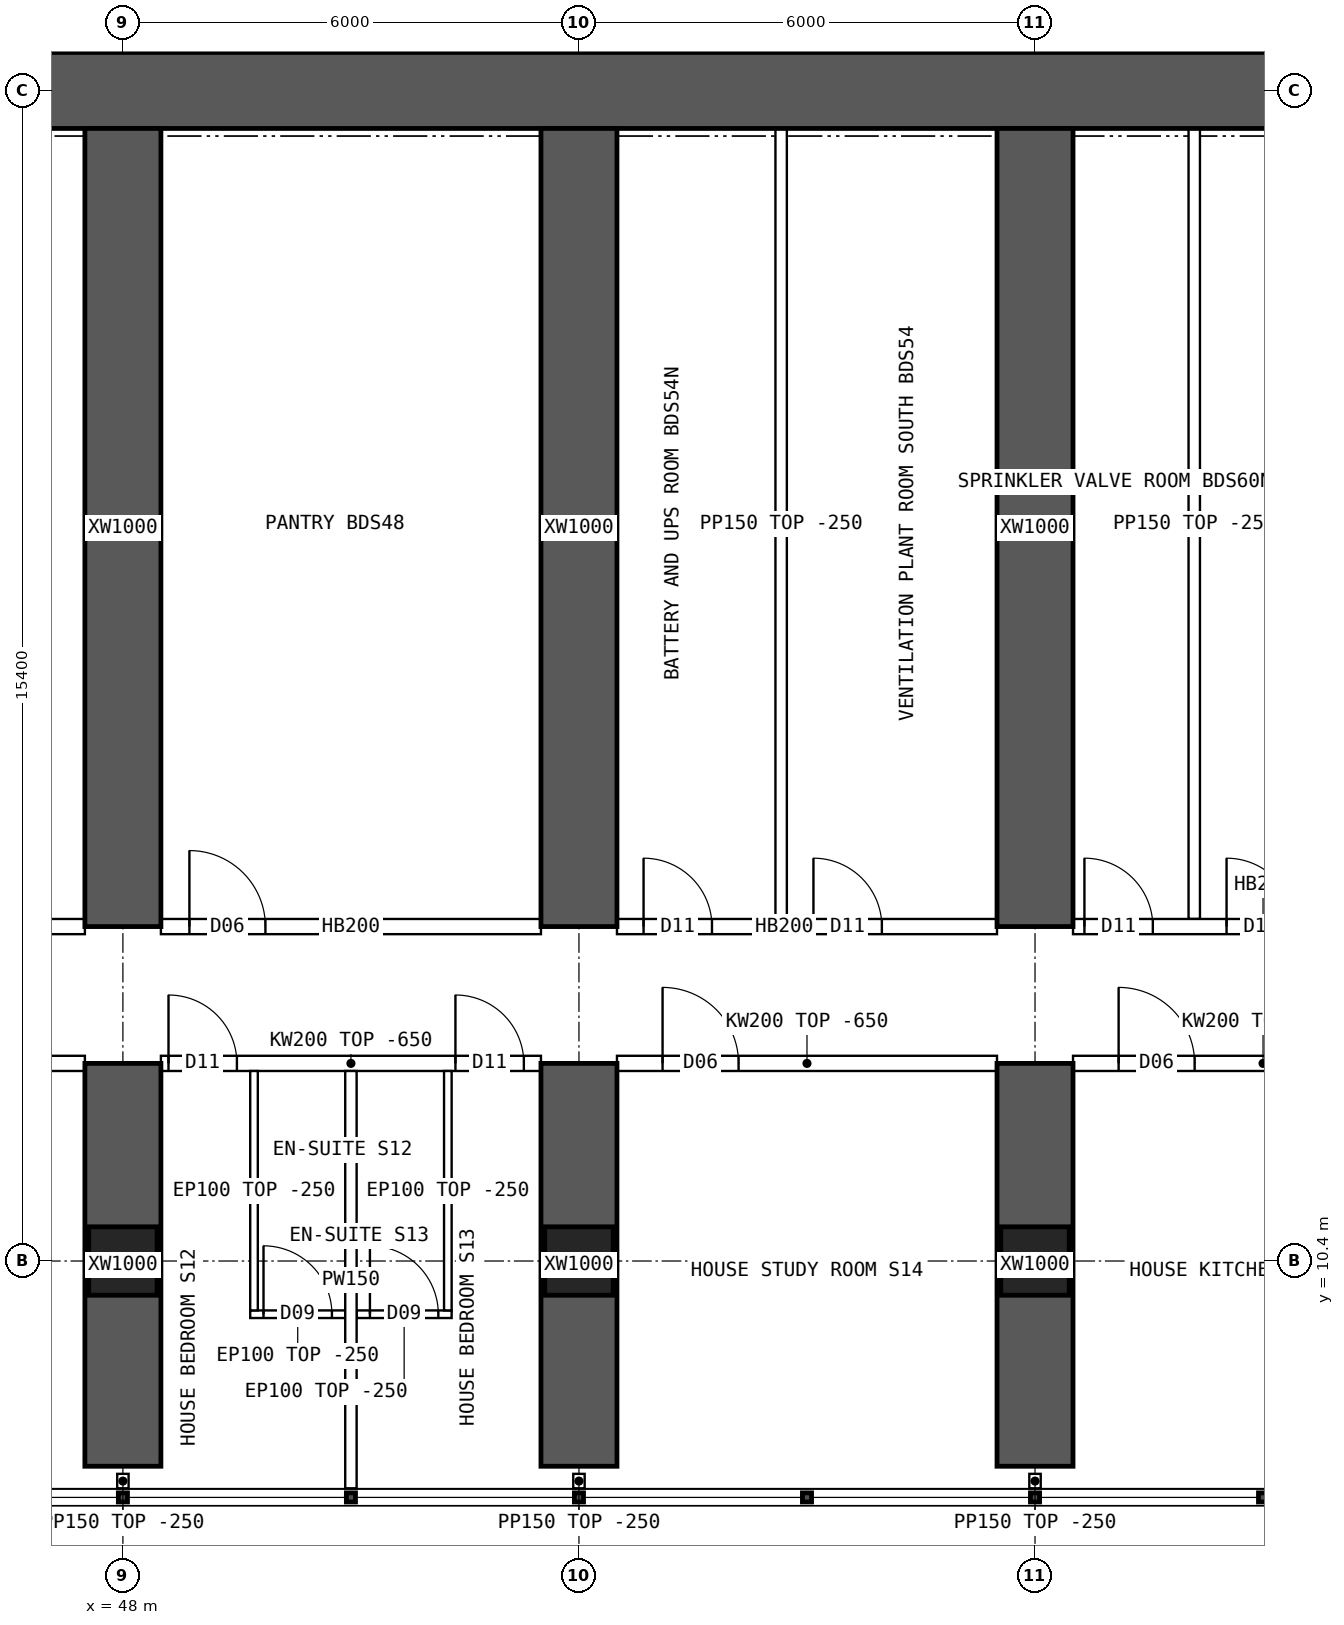
"""IFC4 building model, lengths in metres.
Left out: names, types, materials, properties, quantities, classifications, styles, units other than length and angle.
Written with IfcOpenShell. Run it as: python <this file> out.ifc"""

import sys

from ifc_helpers import new_model, si_unit, direction, frame, frame_2d, origin, origin_2d, place, context, subcontext, project, spatial, polyline, rectangle, hollow_rectangle, outline, extrude, element, fill, save


model = new_model("IFC4")
c1 = context("Model", 3, precision=1e-05, world=origin(), true_north=direction((0.0, 1.0)))
c2 = subcontext(c1, "Body", "Model", "MODEL_VIEW")
j1 = project(units=[si_unit("LENGTHUNIT", "METRE"), si_unit("PLANEANGLEUNIT", "RADIAN")], contexts=[c1])
p1 = place(None, origin())
s1 = spatial("IfcSite", under=j1, at=p1, CompositionType="ELEMENT")
p2 = place(p1, origin())
s2 = spatial("IfcBuilding", under=s1, at=p2, CompositionType="ELEMENT")
p3 = place(p2, frame((0.0, 0.0, 53.95)))
s3 = spatial("IfcBuildingStorey", under=s2, at=p3, CompositionType="ELEMENT", Elevation=53.95)
for number, where, z_axis, x_axis in (
    (1, (48.0, 10.4, 0.0), (0.0, 0.0, 1.0), (1.0, 0.0, 0.0)),
    (2, (54.0, 10.4, 0.0), (0.0, 0.0, 1.0), (1.0, 0.0, 0.0)),
    (3, (60.0, 10.4, 0.0), (0.0, 0.0, 1.0), (1.0, 0.0, 0.0)),
):
    element("IfcColumn", number, at=place(p3, frame(where, z_axis=z_axis, x_axis=x_axis)), inside=s3, PredefinedType="COLUMN", context=c2, shape_type="SweptSolid", body=[
        extrude(hollow_rectangle(XDim=0.9, YDim=0.9, WallThickness=0.09, at=origin_2d()), origin(), (0.0, 0.0, 1.0), 3.75),
    ])
p4 = place(p3, frame((18.0, 25.8, 0.0), z_axis=(0.0, 0.0, 1.0), x_axis=(1.0, 0.0, 0.0)))
e4 = element("IfcWall", 4, at=p4, inside=s3, PredefinedType="SHEAR", context=c2, shape_type="SweptSolid", body=[
    extrude(rectangle(XDim=48.0, YDim=1.0, at=frame_2d((24.0, 0.0))), origin(), (0.0, 0.0, 1.0), 3.75),
])
p5 = place(p3, frame((48.0, 7.7, 0.0), z_axis=(0.0, 0.0, 1.0), x_axis=(0.0, 1.0, 0.0)))
e5 = element("IfcWall", 5, at=p5, inside=s3, PredefinedType="SHEAR", context=c2, shape_type="SweptSolid", body=[
    extrude(rectangle(XDim=5.3, YDim=1.0, at=frame_2d((2.65, 0.0))), origin(), (0.0, 0.0, 1.0), 3.75),
])
p6 = place(p3, frame((48.0, 14.8, 0.0), z_axis=(0.0, 0.0, 1.0), x_axis=(0.0, 1.0, 0.0)))
e6 = element("IfcWall", 6, at=p6, inside=s3, PredefinedType="SHEAR", context=c2, shape_type="SweptSolid", body=[
    extrude(rectangle(XDim=10.5, YDim=1.0, at=frame_2d((5.25, 0.0))), origin(), (0.0, 0.0, 1.0), 3.75),
])
p7 = place(p3, frame((54.0, 7.7, 0.0), z_axis=(0.0, 0.0, 1.0), x_axis=(0.0, 1.0, 0.0)))
e7 = element("IfcWall", 7, at=p7, inside=s3, PredefinedType="SHEAR", context=c2, shape_type="SweptSolid", body=[
    extrude(rectangle(XDim=5.3, YDim=1.0, at=frame_2d((2.65, 0.0))), origin(), (0.0, 0.0, 1.0), 3.75),
])
p8 = place(p3, frame((54.0, 14.8, 0.0), z_axis=(0.0, 0.0, 1.0), x_axis=(0.0, 1.0, 0.0)))
e8 = element("IfcWall", 8, at=p8, inside=s3, PredefinedType="SHEAR", context=c2, shape_type="SweptSolid", body=[
    extrude(rectangle(XDim=10.5, YDim=1.0, at=frame_2d((5.25, 0.0))), origin(), (0.0, 0.0, 1.0), 3.75),
])
p9 = place(p3, frame((60.0, 7.7, 0.0), z_axis=(0.0, 0.0, 1.0), x_axis=(0.0, 1.0, 0.0)))
e9 = element("IfcWall", 9, at=p9, inside=s3, PredefinedType="SHEAR", context=c2, shape_type="SweptSolid", body=[
    extrude(rectangle(XDim=5.3, YDim=1.0, at=frame_2d((2.65, 0.0))), origin(), (0.0, 0.0, 1.0), 3.75),
])
p10 = place(p3, frame((60.0, 14.8, 0.0), z_axis=(0.0, 0.0, 1.0), x_axis=(0.0, 1.0, 0.0)))
e10 = element("IfcWall", 10, at=p10, inside=s3, PredefinedType="SHEAR", context=c2, shape_type="SweptSolid", body=[
    extrude(rectangle(XDim=10.5, YDim=1.0, at=frame_2d((5.25, 0.0))), origin(), (0.0, 0.0, 1.0), 3.75),
])
p11 = place(p3, frame((42.5, 13.0, 0.0), z_axis=(0.0, 0.0, 1.0), x_axis=(1.0, 0.0, 0.0)))
e11 = element("IfcWall", 11, at=p11, inside=s3, PredefinedType="SOLIDWALL", context=c2, shape_type="SweptSolid", body=[
    extrude(outline(polyline([(0.0, 0.0), (5.0, 0.0), (5.0, 3.1), (0.0, 3.1), (0.0, 0.0)])), frame((0.0, 0.1, 0.0), z_axis=(0.0, -1.0, 0.0), x_axis=(1.0, 0.0, 0.0)), (0.0, 0.0, 1.0), 0.2),
])
p12 = place(p11, frame((0.6, 0.0, 0.0)))
e12 = element("IfcOpeningElement", 12, at=p12, cuts=e11, PredefinedType="OPENING", context=c2, shape_type="SweptSolid", body=[
    extrude(rectangle(XDim=1.0, YDim=2.1, at=frame_2d((0.5, 1.05))), frame((0.0, 0.11, 0.0), z_axis=(0.0, -1.0, 0.0), x_axis=(1.0, 0.0, 0.0)), (0.0, 0.0, 1.0), 0.22),
])
p13 = place(p3, frame((42.5, 14.8, 0.0), z_axis=(0.0, 0.0, 1.0), x_axis=(1.0, 0.0, 0.0)))
e13 = element("IfcWall", 13, at=p13, inside=s3, PredefinedType="SOLIDWALL", context=c2, shape_type="SweptSolid", body=[
    extrude(rectangle(XDim=5.0, YDim=0.2, at=frame_2d((2.5, 0.0))), origin(), (0.0, 0.0, 1.0), 3.5),
])
p14 = place(p13, frame((0.35, 0.0, 0.0)))
e14 = element("IfcOpeningElement", 14, at=p14, cuts=e13, PredefinedType="OPENING", context=c2, shape_type="SweptSolid", body=[
    extrude(rectangle(XDim=0.9, YDim=2.1, at=frame_2d((0.45, 1.05))), frame((0.0, 0.11, 0.0), z_axis=(0.0, -1.0, 0.0), x_axis=(1.0, 0.0, 0.0)), (0.0, 0.0, 1.0), 0.22),
])
p15 = place(p13, frame((3.135, 0.0, 0.0)))
e15 = element("IfcOpeningElement", 15, at=p15, cuts=e13, PredefinedType="OPENING", context=c2, shape_type="SweptSolid", body=[
    extrude(rectangle(XDim=0.9, YDim=2.1, at=frame_2d((0.45, 1.05))), frame((0.0, 0.11, 0.0), z_axis=(0.0, -1.0, 0.0), x_axis=(1.0, 0.0, 0.0)), (0.0, 0.0, 1.0), 0.22),
])
p16 = place(p3, frame((48.5, 13.0, 0.0), z_axis=(0.0, 0.0, 1.0), x_axis=(1.0, 0.0, 0.0)))
e16 = element("IfcWall", 16, at=p16, inside=s3, PredefinedType="SOLIDWALL", context=c2, shape_type="SweptSolid", body=[
    extrude(outline(polyline([(0.0, 0.0), (5.0, 0.0), (5.0, 3.1), (0.0, 3.1), (0.0, 0.0)])), frame((0.0, 0.1, 0.0), z_axis=(0.0, -1.0, 0.0), x_axis=(1.0, 0.0, 0.0)), (0.0, 0.0, 1.0), 0.2),
])
p17 = place(p16, frame((0.1, 0.0, 0.0)))
e17 = element("IfcOpeningElement", 17, at=p17, cuts=e16, PredefinedType="OPENING", context=c2, shape_type="SweptSolid", body=[
    extrude(rectangle(XDim=0.9, YDim=2.1, at=frame_2d((0.45, 1.05))), frame((0.0, 0.11, 0.0), z_axis=(0.0, -1.0, 0.0), x_axis=(1.0, 0.0, 0.0)), (0.0, 0.0, 1.0), 0.22),
])
p18 = place(p16, frame((3.875, 0.0, 0.0)))
e18 = element("IfcOpeningElement", 18, at=p18, cuts=e16, PredefinedType="OPENING", context=c2, shape_type="SweptSolid", body=[
    extrude(rectangle(XDim=0.9, YDim=2.1, at=frame_2d((0.45, 1.05))), frame((0.0, 0.11, 0.0), z_axis=(0.0, -1.0, 0.0), x_axis=(1.0, 0.0, 0.0)), (0.0, 0.0, 1.0), 0.22),
])
p19 = place(p3, frame((48.5, 14.8, 0.0), z_axis=(0.0, 0.0, 1.0), x_axis=(1.0, 0.0, 0.0)))
e19 = element("IfcWall", 19, at=p19, inside=s3, PredefinedType="SOLIDWALL", context=c2, shape_type="SweptSolid", body=[
    extrude(rectangle(XDim=5.0, YDim=0.2, at=frame_2d((2.5, 0.0))), origin(), (0.0, 0.0, 1.0), 3.5),
])
p20 = place(p19, frame((0.375, 0.0, 0.0)))
e20 = element("IfcOpeningElement", 20, at=p20, cuts=e19, PredefinedType="OPENING", context=c2, shape_type="SweptSolid", body=[
    extrude(rectangle(XDim=1.0, YDim=2.1, at=frame_2d((0.5, 1.05))), frame((0.0, 0.11, 0.0), z_axis=(0.0, -1.0, 0.0), x_axis=(1.0, 0.0, 0.0)), (0.0, 0.0, 1.0), 0.22),
])
p21 = place(p3, frame((54.5, 13.0, 0.0), z_axis=(0.0, 0.0, 1.0), x_axis=(1.0, 0.0, 0.0)))
e21 = element("IfcWall", 21, at=p21, inside=s3, PredefinedType="SOLIDWALL", context=c2, shape_type="SweptSolid", body=[
    extrude(outline(polyline([(0.0, 0.0), (5.0, 0.0), (5.0, 3.1), (0.0, 3.1), (0.0, 0.0)])), frame((0.0, 0.1, 0.0), z_axis=(0.0, -1.0, 0.0), x_axis=(1.0, 0.0, 0.0)), (0.0, 0.0, 1.0), 0.2),
])
p22 = place(p21, frame((0.6, 0.0, 0.0)))
e22 = element("IfcOpeningElement", 22, at=p22, cuts=e21, PredefinedType="OPENING", context=c2, shape_type="SweptSolid", body=[
    extrude(rectangle(XDim=1.0, YDim=2.1, at=frame_2d((0.5, 1.05))), frame((0.0, 0.11, 0.0), z_axis=(0.0, -1.0, 0.0), x_axis=(1.0, 0.0, 0.0)), (0.0, 0.0, 1.0), 0.22),
])
p23 = place(p3, frame((54.5, 14.8, 0.0), z_axis=(0.0, 0.0, 1.0), x_axis=(1.0, 0.0, 0.0)))
e23 = element("IfcWall", 23, at=p23, inside=s3, PredefinedType="SOLIDWALL", context=c2, shape_type="SweptSolid", body=[
    extrude(rectangle(XDim=5.0, YDim=0.2, at=frame_2d((2.5, 0.0))), origin(), (0.0, 0.0, 1.0), 3.5),
])
p24 = place(p23, frame((0.35, 0.0, 0.0)))
e24 = element("IfcOpeningElement", 24, at=p24, cuts=e23, PredefinedType="OPENING", context=c2, shape_type="SweptSolid", body=[
    extrude(rectangle(XDim=0.9, YDim=2.1, at=frame_2d((0.45, 1.05))), frame((0.0, 0.11, 0.0), z_axis=(0.0, -1.0, 0.0), x_axis=(1.0, 0.0, 0.0)), (0.0, 0.0, 1.0), 0.22),
])
p25 = place(p23, frame((2.585, 0.0, 0.0)))
e25 = element("IfcOpeningElement", 25, at=p25, cuts=e23, PredefinedType="OPENING", context=c2, shape_type="SweptSolid", body=[
    extrude(rectangle(XDim=0.9, YDim=2.1, at=frame_2d((0.45, 1.05))), frame((0.0, 0.11, 0.0), z_axis=(0.0, -1.0, 0.0), x_axis=(1.0, 0.0, 0.0)), (0.0, 0.0, 1.0), 0.22),
])
p26 = place(p3, frame((60.5, 13.0, 0.0), z_axis=(0.0, 0.0, 1.0), x_axis=(1.0, 0.0, 0.0)))
e26 = element("IfcWall", 26, at=p26, inside=s3, PredefinedType="SOLIDWALL", context=c2, shape_type="SweptSolid", body=[
    extrude(outline(polyline([(0.0, 0.0), (5.0, 0.0), (5.0, 3.1), (0.0, 3.1), (0.0, 0.0)])), frame((0.0, 0.1, 0.0), z_axis=(0.0, -1.0, 0.0), x_axis=(1.0, 0.0, 0.0)), (0.0, 0.0, 1.0), 0.2),
])
p27 = place(p26, frame((0.6, 0.0, 0.0)))
e27 = element("IfcOpeningElement", 27, at=p27, cuts=e26, PredefinedType="OPENING", context=c2, shape_type="SweptSolid", body=[
    extrude(rectangle(XDim=1.0, YDim=2.1, at=frame_2d((0.5, 1.05))), frame((0.0, 0.11, 0.0), z_axis=(0.0, -1.0, 0.0), x_axis=(1.0, 0.0, 0.0)), (0.0, 0.0, 1.0), 0.22),
])
p28 = place(p3, frame((60.5, 14.8, 0.0), z_axis=(0.0, 0.0, 1.0), x_axis=(1.0, 0.0, 0.0)))
e28 = element("IfcWall", 28, at=p28, inside=s3, PredefinedType="SOLIDWALL", context=c2, shape_type="SweptSolid", body=[
    extrude(rectangle(XDim=5.0, YDim=0.2, at=frame_2d((2.5, 0.0))), origin(), (0.0, 0.0, 1.0), 3.5),
])
p29 = place(p28, frame((0.15, 0.0, 0.0)))
e29 = element("IfcOpeningElement", 29, at=p29, cuts=e28, PredefinedType="OPENING", context=c2, shape_type="SweptSolid", body=[
    extrude(rectangle(XDim=0.9, YDim=2.1, at=frame_2d((0.45, 1.05))), frame((0.0, 0.11, 0.0), z_axis=(0.0, -1.0, 0.0), x_axis=(1.0, 0.0, 0.0)), (0.0, 0.0, 1.0), 0.22),
])
p30 = place(p28, frame((2.02, 0.0, 0.0)))
e30 = element("IfcOpeningElement", 30, at=p30, cuts=e28, PredefinedType="OPENING", context=c2, shape_type="SweptSolid", body=[
    extrude(rectangle(XDim=0.9, YDim=2.1, at=frame_2d((0.45, 1.05))), frame((0.0, 0.11, 0.0), z_axis=(0.0, -1.0, 0.0), x_axis=(1.0, 0.0, 0.0)), (0.0, 0.0, 1.0), 0.22),
])
p31 = place(p3, frame((51.0, 7.41, 0.0), z_axis=(0.0, 0.0, 1.0), x_axis=(0.0, 1.0, 0.0)))
e31 = element("IfcWall", 31, at=p31, inside=s3, PredefinedType="PARTITIONING", context=c2, shape_type="SweptSolid", body=[
    extrude(outline(polyline([(0.0, 0.0), (5.49, 0.0), (5.49, 3.1), (5.442, 3.1), (5.44, 3.5), (3.192, 3.5), (3.19, 3.1), (2.792, 3.1), (2.79, 3.5), (0.0, 3.5), (0.0, 0.0)])), frame((0.0, 0.075, 0.0), z_axis=(0.0, -1.0, 0.0), x_axis=(1.0, 0.0, 0.0)), (0.0, 0.0, 1.0), 0.15),
])
p32 = place(p3, frame((50.925, 9.7, 0.0), z_axis=(0.0, 0.0, 1.0), x_axis=(-1.0, 0.0, 0.0)))
e32 = element("IfcWall", 32, at=p32, inside=s3, PredefinedType="PARTITIONING", context=c2, shape_type="SweptSolid", body=[
    extrude(rectangle(XDim=1.25, YDim=0.1, at=frame_2d((0.625, 0.0))), origin(), (0.0, 0.0, 1.0), 3.5),
])
p33 = place(p32, frame((0.175, 0.0, 0.0)))
e33 = element("IfcOpeningElement", 33, at=p33, cuts=e32, PredefinedType="OPENING", context=c2, shape_type="SweptSolid", body=[
    extrude(rectangle(XDim=0.9, YDim=2.1, at=frame_2d((0.45, 1.05))), frame((0.0, 0.06, 0.0), z_axis=(0.0, -1.0, 0.0), x_axis=(1.0, 0.0, 0.0)), (0.0, 0.0, 1.0), 0.12),
])
p34 = place(p3, frame((49.725, 9.75, 0.0), z_axis=(0.0, 0.0, 1.0), x_axis=(0.0, 1.0, 0.0)))
e34 = element("IfcWall", 34, at=p34, inside=s3, PredefinedType="PARTITIONING", context=c2, shape_type="SweptSolid", body=[
    extrude(outline(polyline([(0.0, 0.0), (3.15, 0.0), (3.15, 3.1), (3.102, 3.1), (3.1, 3.5), (0.852, 3.5), (0.85, 3.1), (0.452, 3.1), (0.45, 3.5), (0.0, 3.5), (0.0, 0.0)])), frame((0.0, 0.05, 0.0), z_axis=(0.0, -1.0, 0.0), x_axis=(1.0, 0.0, 0.0)), (0.0, 0.0, 1.0), 0.1),
])
p35 = place(p3, frame((52.325, 9.7, 0.0), z_axis=(0.0, 0.0, 1.0), x_axis=(-1.0, 0.0, 0.0)))
e35 = element("IfcWall", 35, at=p35, inside=s3, PredefinedType="PARTITIONING", context=c2, shape_type="SweptSolid", body=[
    extrude(rectangle(XDim=1.25, YDim=0.1, at=frame_2d((0.625, 0.0))), origin(), (0.0, 0.0, 1.0), 3.5),
])
p36 = place(p35, frame((0.175, 0.0, 0.0)))
e36 = element("IfcOpeningElement", 36, at=p36, cuts=e35, PredefinedType="OPENING", context=c2, shape_type="SweptSolid", body=[
    extrude(rectangle(XDim=0.9, YDim=2.1, at=frame_2d((0.45, 1.05))), frame((0.0, 0.06, 0.0), z_axis=(0.0, -1.0, 0.0), x_axis=(1.0, 0.0, 0.0)), (0.0, 0.0, 1.0), 0.12),
])
p37 = place(p3, frame((52.275, 9.75, 0.0), z_axis=(0.0, 0.0, 1.0), x_axis=(0.0, 1.0, 0.0)))
e37 = element("IfcWall", 37, at=p37, inside=s3, PredefinedType="PARTITIONING", context=c2, shape_type="SweptSolid", body=[
    extrude(outline(polyline([(0.0, 0.0), (3.15, 0.0), (3.15, 3.1), (3.102, 3.1), (3.1, 3.5), (0.852, 3.5), (0.85, 3.1), (0.452, 3.1), (0.45, 3.5), (0.0, 3.5), (0.0, 0.0)])), frame((0.0, 0.05, 0.0), z_axis=(0.0, -1.0, 0.0), x_axis=(1.0, 0.0, 0.0)), (0.0, 0.0, 1.0), 0.1),
])
for number, where, z_axis, x_axis in (
    (38, (56.66, 14.9, 0.0), (0.0, 0.0, 1.0), (0.0, 1.0, 0.0)),
    (39, (62.095, 14.9, 0.0), (0.0, 0.0, 1.0), (0.0, 1.0, 0.0)),
):
    element("IfcWall", number, at=place(p3, frame(where, z_axis=z_axis, x_axis=x_axis)), inside=s3, PredefinedType="PARTITIONING", context=c2, shape_type="SweptSolid", body=[
        extrude(rectangle(XDim=10.4, YDim=0.15, at=frame_2d((5.2, 0.0))), origin(), (0.0, 0.0, 1.0), 3.5),
    ])
for number, where, z_axis, x_axis in (
    (40, (48.0, 7.6, 0.0), (0.0, 0.0, 1.0), (0.0, -1.0, 0.0)),
    (41, (54.0, 7.6, 0.0), (0.0, 0.0, 1.0), (0.0, -1.0, 0.0)),
    (42, (60.0, 7.6, 0.0), (0.0, 0.0, 1.0), (0.0, -1.0, 0.0)),
):
    element("IfcWall", number, at=place(p3, frame(where, z_axis=z_axis, x_axis=x_axis)), inside=s3, PredefinedType="PARTITIONING", context=c2, shape_type="SweptSolid", body=[
        extrude(rectangle(XDim=0.19, YDim=0.15, at=frame_2d((0.095, 0.0))), origin(), (0.0, 0.0, 1.0), 3.5),
    ])
p38 = place(p33, origin())
e43 = element("IfcDoor", 43, at=p38, inside=s3, OperationType="SINGLE_SWING_RIGHT", PredefinedType="DOOR", context=c2, shape_type="SweptSolid", body=[
    extrude(rectangle(XDim=0.9, YDim=2.1, at=frame_2d((0.45, 1.05))), frame((0.0, 0.025, 0.0), z_axis=(0.0, -1.0, 0.0), x_axis=(1.0, 0.0, 0.0)), (0.0, 0.0, 1.0), 0.05),
])
fill(e33, e43)
p39 = place(p17, origin())
e44 = element("IfcDoor", 44, at=p39, inside=s3, OperationType="SINGLE_SWING_LEFT", PredefinedType="DOOR", context=c2, shape_type="SweptSolid", body=[
    extrude(rectangle(XDim=0.9, YDim=2.1, at=frame_2d((0.45, 1.05))), frame((0.0, 0.025, 0.0), z_axis=(0.0, -1.0, 0.0), x_axis=(1.0, 0.0, 0.0)), (0.0, 0.0, 1.0), 0.05),
])
fill(e17, e44)
p40 = place(p36, origin())
e45 = element("IfcDoor", 45, at=p40, inside=s3, OperationType="SINGLE_SWING_RIGHT", PredefinedType="DOOR", context=c2, shape_type="SweptSolid", body=[
    extrude(rectangle(XDim=0.9, YDim=2.1, at=frame_2d((0.45, 1.05))), frame((0.0, 0.025, 0.0), z_axis=(0.0, -1.0, 0.0), x_axis=(1.0, 0.0, 0.0)), (0.0, 0.0, 1.0), 0.05),
])
fill(e36, e45)
p41 = place(p18, origin())
e46 = element("IfcDoor", 46, at=p41, inside=s3, OperationType="SINGLE_SWING_LEFT", PredefinedType="DOOR", context=c2, shape_type="SweptSolid", body=[
    extrude(rectangle(XDim=0.9, YDim=2.1, at=frame_2d((0.45, 1.05))), frame((0.0, 0.025, 0.0), z_axis=(0.0, -1.0, 0.0), x_axis=(1.0, 0.0, 0.0)), (0.0, 0.0, 1.0), 0.05),
])
fill(e18, e46)
p42 = place(p22, origin())
e47 = element("IfcDoor", 47, at=p42, inside=s3, OperationType="SINGLE_SWING_LEFT", PredefinedType="DOOR", context=c2, shape_type="SweptSolid", body=[
    extrude(rectangle(XDim=1.0, YDim=2.1, at=frame_2d((0.5, 1.05))), frame((0.0, 0.025, 0.0), z_axis=(0.0, -1.0, 0.0), x_axis=(1.0, 0.0, 0.0)), (0.0, 0.0, 1.0), 0.05),
])
fill(e22, e47)
p43 = place(p27, origin())
e48 = element("IfcDoor", 48, at=p43, inside=s3, OperationType="SINGLE_SWING_LEFT", PredefinedType="DOOR", context=c2, shape_type="SweptSolid", body=[
    extrude(rectangle(XDim=1.0, YDim=2.1, at=frame_2d((0.5, 1.05))), frame((0.0, 0.025, 0.0), z_axis=(0.0, -1.0, 0.0), x_axis=(1.0, 0.0, 0.0)), (0.0, 0.0, 1.0), 0.05),
])
fill(e27, e48)
p44 = place(p20, origin())
e49 = element("IfcDoor", 49, at=p44, inside=s3, OperationType="SINGLE_SWING_LEFT", PredefinedType="DOOR", context=c2, shape_type="SweptSolid", body=[
    extrude(rectangle(XDim=1.0, YDim=2.1, at=frame_2d((0.5, 1.05))), frame((0.0, 0.025, 0.0), z_axis=(0.0, -1.0, 0.0), x_axis=(1.0, 0.0, 0.0)), (0.0, 0.0, 1.0), 0.05),
])
fill(e20, e49)
p45 = place(p24, origin())
e50 = element("IfcDoor", 50, at=p45, inside=s3, OperationType="SINGLE_SWING_LEFT", PredefinedType="DOOR", context=c2, shape_type="SweptSolid", body=[
    extrude(rectangle(XDim=0.9, YDim=2.1, at=frame_2d((0.45, 1.05))), frame((0.0, 0.025, 0.0), z_axis=(0.0, -1.0, 0.0), x_axis=(1.0, 0.0, 0.0)), (0.0, 0.0, 1.0), 0.05),
])
fill(e24, e50)
p46 = place(p25, origin())
e51 = element("IfcDoor", 51, at=p46, inside=s3, OperationType="SINGLE_SWING_LEFT", PredefinedType="DOOR", context=c2, shape_type="SweptSolid", body=[
    extrude(rectangle(XDim=0.9, YDim=2.1, at=frame_2d((0.45, 1.05))), frame((0.0, 0.025, 0.0), z_axis=(0.0, -1.0, 0.0), x_axis=(1.0, 0.0, 0.0)), (0.0, 0.0, 1.0), 0.05),
])
fill(e25, e51)
p47 = place(p29, origin())
e52 = element("IfcDoor", 52, at=p47, inside=s3, OperationType="SINGLE_SWING_LEFT", PredefinedType="DOOR", context=c2, shape_type="SweptSolid", body=[
    extrude(rectangle(XDim=0.9, YDim=2.1, at=frame_2d((0.45, 1.05))), frame((0.0, 0.025, 0.0), z_axis=(0.0, -1.0, 0.0), x_axis=(1.0, 0.0, 0.0)), (0.0, 0.0, 1.0), 0.05),
])
fill(e29, e52)
p48 = place(p30, origin())
e53 = element("IfcDoor", 53, at=p48, inside=s3, OperationType="SINGLE_SWING_LEFT", PredefinedType="DOOR", context=c2, shape_type="SweptSolid", body=[
    extrude(rectangle(XDim=0.9, YDim=2.1, at=frame_2d((0.45, 1.05))), frame((0.0, 0.025, 0.0), z_axis=(0.0, -1.0, 0.0), x_axis=(1.0, 0.0, 0.0)), (0.0, 0.0, 1.0), 0.05),
])
fill(e30, e53)
save(model, sys.argv[1])
